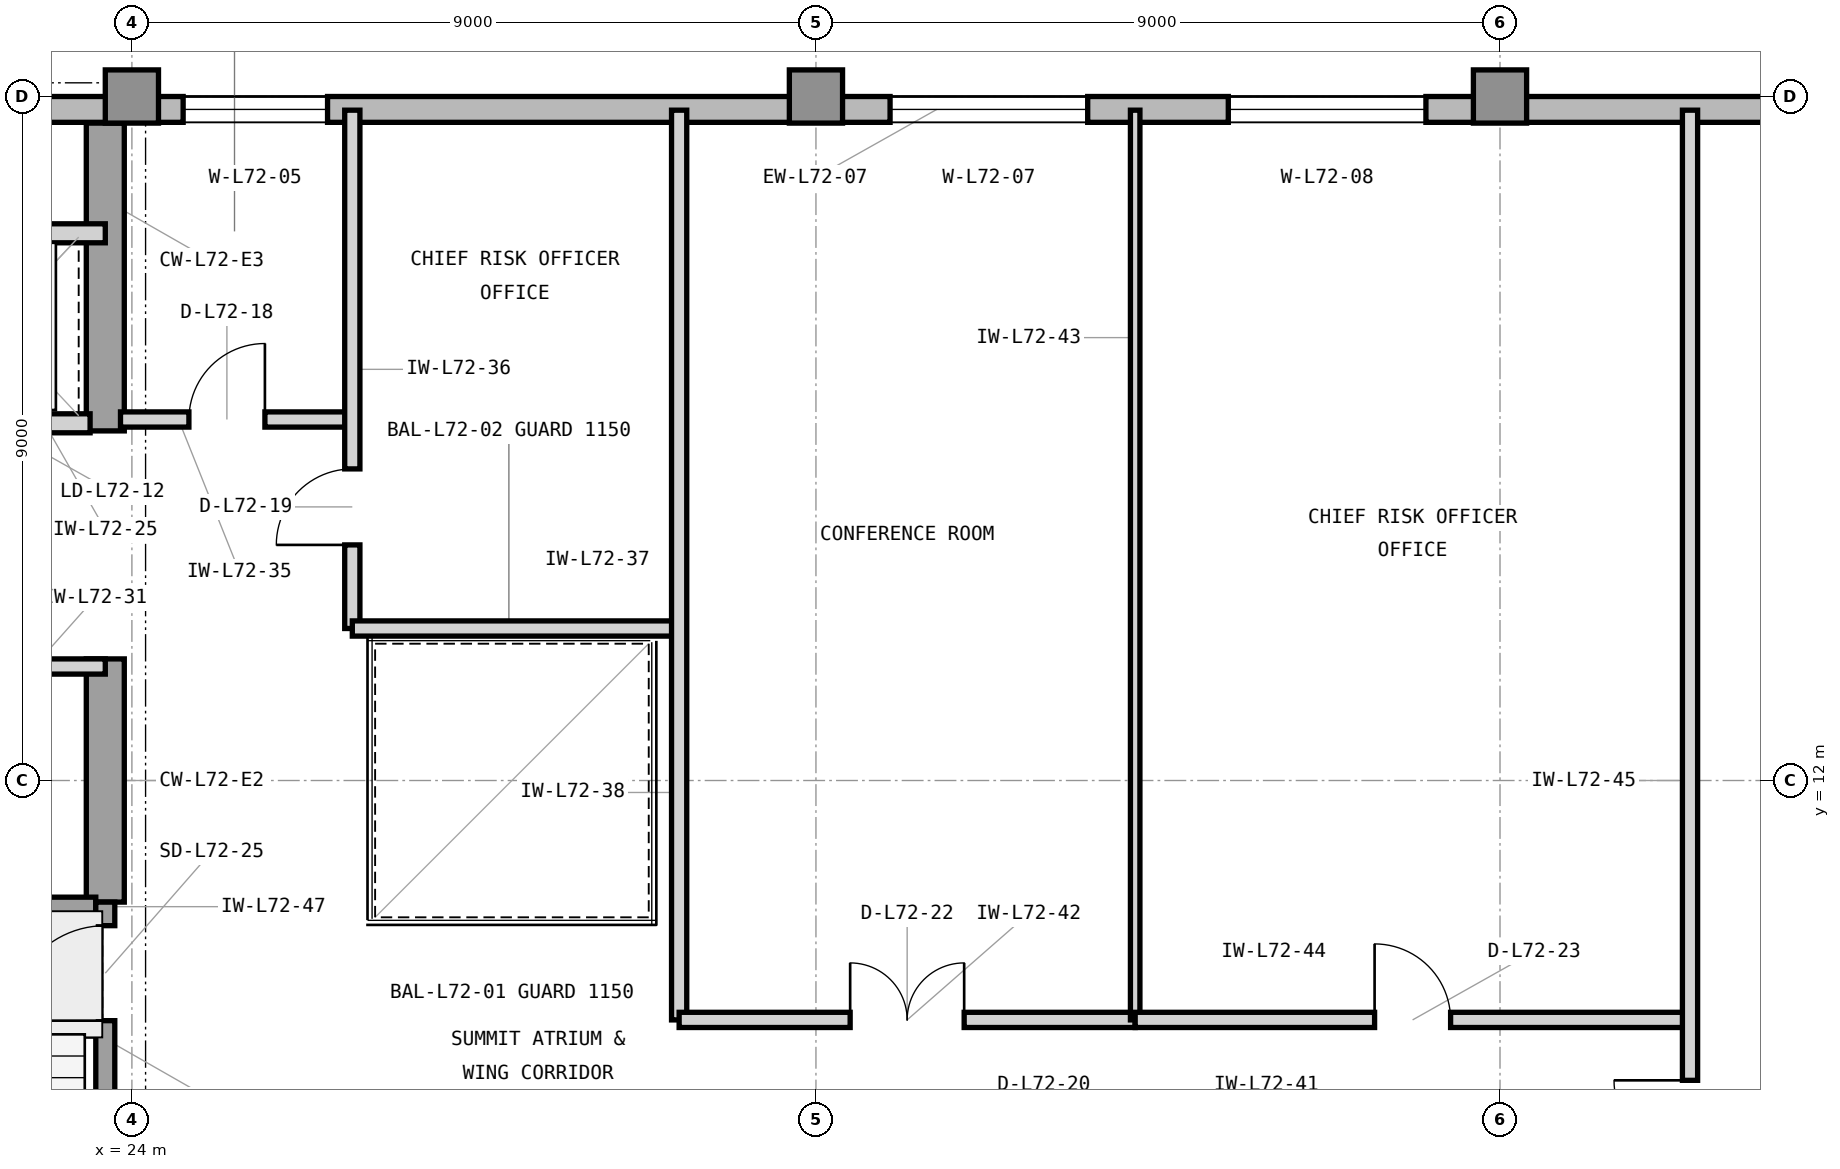
"""IFC4 building model, lengths in metres.
Left out: names, types, materials, properties, quantities, classifications, styles, units other than length and angle.
Written with IfcOpenShell. Run it as: python <this file> out.ifc"""

import sys

from ifc_helpers import new_model, si_unit, direction, frame, frame_2d, origin, origin_2d, place, context, subcontext, project, spatial, rectangle, extrude, element, fill, save


model = new_model("IFC4")
c1 = context("Model", 3, precision=1e-05, world=origin(), true_north=direction((0.0, 1.0)))
c2 = subcontext(c1, "Body", "Model", "MODEL_VIEW")
j1 = project(units=[si_unit("LENGTHUNIT", "METRE"), si_unit("PLANEANGLEUNIT", "RADIAN")], contexts=[c1])
p1 = place(None, origin())
s1 = spatial("IfcSite", under=j1, at=p1, CompositionType="ELEMENT")
p2 = place(p1, origin())
s2 = spatial("IfcBuilding", under=s1, at=p2, CompositionType="ELEMENT")
p3 = place(p2, frame((0.0, 0.0, 293.7)))
s3 = spatial("IfcBuildingStorey", under=s2, at=p3, CompositionType="ELEMENT", Elevation=293.7)
p4 = place(p3, frame((23.65, 10.4, 0.0), z_axis=(0.0, 0.0, 1.0), x_axis=(0.0, 1.0, 0.0)))
e1 = element("IfcWall", 1, at=p4, inside=s3, PredefinedType="SHEAR", context=c2, shape_type="SweptSolid", body=[
    extrude(rectangle(XDim=3.2, YDim=0.5, at=frame_2d((1.6, 0.0))), origin(), (0.0, 0.0, 1.0), 3.9),
])
p5 = place(p3, frame((23.65, 16.6, 0.0), z_axis=(0.0, 0.0, 1.0), x_axis=(0.0, 1.0, 0.0)))
e2 = element("IfcWall", 2, at=p5, inside=s3, PredefinedType="SHEAR", context=c2, shape_type="SweptSolid", body=[
    extrude(rectangle(XDim=4.05, YDim=0.5, at=frame_2d((2.025, 0.0))), origin(), (0.0, 0.0, 1.0), 3.9),
])
for number, where, z_axis, x_axis in (
    (3, (24.0, 21.0, 0.0), (0.0, 0.0, 1.0), (1.0, 0.0, 0.0)),
    (4, (33.0, 21.0, 0.0), (0.0, 0.0, 1.0), (1.0, 0.0, 0.0)),
    (5, (42.0, 21.0, 0.0), (0.0, 0.0, 1.0), (1.0, 0.0, 0.0)),
):
    element("IfcColumn", number, at=place(p3, frame(where, z_axis=z_axis, x_axis=x_axis)), inside=s3, PredefinedType="COLUMN", context=c2, shape_type="SweptSolid", body=[
        extrude(rectangle(XDim=0.7, YDim=0.7, at=origin_2d()), origin(), (0.0, 0.0, 1.0), 3.9),
    ])
p6 = place(p3, frame((49.4, 20.83, 0.0), z_axis=(0.0, 0.0, 1.0), x_axis=(-1.0, 0.0, 0.0)))
e6 = element("IfcWall", 6, at=p6, inside=s3, PredefinedType="STANDARD", context=c2, shape_type="SweptSolid", body=[
    extrude(rectangle(XDim=29.62, YDim=0.34, at=frame_2d((14.81, 0.0))), origin(), (0.0, 0.0, 1.0), 3.715),
])
p7 = place(p6, frame((22.826, 0.0, 0.8)))
e7 = element("IfcOpeningElement", 7, at=p7, cuts=e6, PredefinedType="OPENING", context=c2, shape_type="SweptSolid", body=[
    extrude(rectangle(XDim=1.9, YDim=2.35, at=frame_2d((0.95, 1.175))), frame((0.0, 0.18, 0.0), z_axis=(0.0, -1.0, 0.0), x_axis=(1.0, 0.0, 0.0)), (0.0, 0.0, 1.0), 0.36),
])
p8 = place(p6, frame((12.825, 0.0, 0.8)))
e8 = element("IfcOpeningElement", 8, at=p8, cuts=e6, PredefinedType="OPENING", context=c2, shape_type="SweptSolid", body=[
    extrude(rectangle(XDim=2.6, YDim=2.35, at=frame_2d((1.3, 1.175))), frame((0.0, 0.18, 0.0), z_axis=(0.0, -1.0, 0.0), x_axis=(1.0, 0.0, 0.0)), (0.0, 0.0, 1.0), 0.36),
])
p9 = place(p6, frame((8.375, 0.0, 0.8)))
e9 = element("IfcOpeningElement", 9, at=p9, cuts=e6, PredefinedType="OPENING", context=c2, shape_type="SweptSolid", body=[
    extrude(rectangle(XDim=2.6, YDim=2.35, at=frame_2d((1.3, 1.175))), frame((0.0, 0.18, 0.0), z_axis=(0.0, -1.0, 0.0), x_axis=(1.0, 0.0, 0.0)), (0.0, 0.0, 1.0), 0.36),
])
p10 = place(p3, frame((21.05, 16.7, 0.0), z_axis=(0.0, 0.0, 1.0), x_axis=(1.0, 0.0, 0.0)))
e10 = element("IfcWall", 10, at=p10, inside=s3, PredefinedType="PARTITIONING", context=c2, shape_type="SweptSolid", body=[
    extrude(rectangle(XDim=2.4, YDim=0.25, at=frame_2d((1.2, 0.0))), origin(), (0.0, 0.0, 1.0), 3.354),
])
p11 = place(p10, frame((0.52, 0.0, 0.0)))
e11 = element("IfcOpeningElement", 11, at=p11, cuts=e10, PredefinedType="OPENING", context=c2, shape_type="SweptSolid", body=[
    extrude(rectangle(XDim=1.15, YDim=2.25, at=frame_2d((0.575, 1.125))), frame((0.0, 0.135, 0.0), z_axis=(0.0, -1.0, 0.0), x_axis=(1.0, 0.0, 0.0)), (0.0, 0.0, 1.0), 0.27),
])
p12 = place(p3, frame((16.45, 19.2, 0.0), z_axis=(0.0, 0.0, 1.0), x_axis=(1.0, 0.0, 0.0)))
e12 = element("IfcWall", 12, at=p12, inside=s3, PredefinedType="PARTITIONING", context=c2, shape_type="SweptSolid", body=[
    extrude(rectangle(XDim=7.2, YDim=0.25, at=frame_2d((3.6, 0.0))), origin(), (0.0, 0.0, 1.0), 3.705),
])
p13 = place(p3, frame((19.9, 13.5, 0.0), z_axis=(0.0, 0.0, 1.0), x_axis=(1.0, 0.0, 0.0)))
e13 = element("IfcWall", 13, at=p13, inside=s3, PredefinedType="PARTITIONING", context=c2, shape_type="SweptSolid", body=[
    extrude(rectangle(XDim=3.75, YDim=0.2, at=frame_2d((1.875, 0.0))), origin(), (0.0, 0.0, 1.0), 3.354),
])
p14 = place(p13, frame((1.4, 0.0, 0.0)))
e14 = element("IfcOpeningElement", 14, at=p14, cuts=e13, PredefinedType="OPENING", context=c2, shape_type="SweptSolid", body=[
    extrude(rectangle(XDim=0.95, YDim=2.1, at=frame_2d((0.475, 1.05))), frame((0.0, 0.11, 0.0), z_axis=(0.0, -1.0, 0.0), x_axis=(1.0, 0.0, 0.0)), (0.0, 0.0, 1.0), 0.22),
])
p15 = place(p3, frame((23.85, 16.75, 0.0), z_axis=(0.0, 0.0, 1.0), x_axis=(1.0, 0.0, 0.0)))
e15 = element("IfcWall", 15, at=p15, inside=s3, PredefinedType="PARTITIONING", context=c2, shape_type="SweptSolid", body=[
    extrude(rectangle(XDim=3.05, YDim=0.2, at=frame_2d((1.525, 0.0))), origin(), (0.0, 0.0, 1.0), 3.705),
])
p16 = place(p15, frame((0.9, 0.0, 0.0)))
e16 = element("IfcOpeningElement", 16, at=p16, cuts=e15, PredefinedType="OPENING", context=c2, shape_type="SweptSolid", body=[
    extrude(rectangle(XDim=1.0, YDim=2.15, at=frame_2d((0.5, 1.075))), frame((0.0, 0.11, 0.0), z_axis=(0.0, -1.0, 0.0), x_axis=(1.0, 0.0, 0.0)), (0.0, 0.0, 1.0), 0.22),
])
p17 = place(p3, frame((26.9, 14.0, 0.0), z_axis=(0.0, 0.0, 1.0), x_axis=(0.0, 1.0, 0.0)))
e17 = element("IfcWall", 17, at=p17, inside=s3, PredefinedType="PARTITIONING", context=c2, shape_type="SweptSolid", body=[
    extrude(rectangle(XDim=6.82, YDim=0.2, at=frame_2d((3.41, 0.0))), origin(), (0.0, 0.0, 1.0), 3.705),
])
p18 = place(p17, frame((1.1, 0.0, 0.0)))
e18 = element("IfcOpeningElement", 18, at=p18, cuts=e17, PredefinedType="OPENING", context=c2, shape_type="SweptSolid", body=[
    extrude(rectangle(XDim=1.0, YDim=2.15, at=frame_2d((0.5, 1.075))), frame((0.0, 0.11, 0.0), z_axis=(0.0, -1.0, 0.0), x_axis=(1.0, 0.0, 0.0)), (0.0, 0.0, 1.0), 0.22),
])
p19 = place(p3, frame((26.9, 14.0, 0.0), z_axis=(0.0, 0.0, 1.0), x_axis=(1.0, 0.0, 0.0)))
e19 = element("IfcWall", 19, at=p19, inside=s3, PredefinedType="PARTITIONING", context=c2, shape_type="SweptSolid", body=[
    extrude(rectangle(XDim=4.3, YDim=0.2, at=frame_2d((2.15, 0.0))), origin(), (0.0, 0.0, 1.0), 3.705),
])
p20 = place(p3, frame((31.2, 8.85, 0.0), z_axis=(0.0, 0.0, 1.0), x_axis=(0.0, 1.0, 0.0)))
e20 = element("IfcWall", 20, at=p20, inside=s3, PredefinedType="PARTITIONING", context=c2, shape_type="SweptSolid", body=[
    extrude(rectangle(XDim=11.97, YDim=0.2, at=frame_2d((5.985, 0.0))), origin(), (0.0, 0.0, 1.0), 3.705),
])
p21 = place(p3, frame((31.2, 8.85, 0.0), z_axis=(0.0, 0.0, 1.0), x_axis=(1.0, 0.0, 0.0)))
e21 = element("IfcWall", 21, at=p21, inside=s3, PredefinedType="PARTITIONING", context=c2, shape_type="SweptSolid", body=[
    extrude(rectangle(XDim=6.0, YDim=0.2, at=frame_2d((3.0, 0.0))), origin(), (0.0, 0.0, 1.0), 3.705),
])
p22 = place(p21, frame((2.25, 0.0, 0.0)))
e22 = element("IfcOpeningElement", 22, at=p22, cuts=e21, PredefinedType="OPENING", context=c2, shape_type="SweptSolid", body=[
    extrude(rectangle(XDim=1.5, YDim=2.3, at=frame_2d((0.75, 1.15))), frame((0.0, 0.11, 0.0), z_axis=(0.0, -1.0, 0.0), x_axis=(1.0, 0.0, 0.0)), (0.0, 0.0, 1.0), 0.22),
])
p23 = place(p3, frame((37.2, 8.85, 0.0), z_axis=(0.0, 0.0, 1.0), x_axis=(0.0, 1.0, 0.0)))
e23 = element("IfcWall", 23, at=p23, inside=s3, PredefinedType="PARTITIONING", context=c2, shape_type="SweptSolid", body=[
    extrude(rectangle(XDim=11.97, YDim=0.125, at=frame_2d((5.985, 0.0))), origin(), (0.0, 0.0, 1.0), 3.705),
])
p24 = place(p3, frame((37.2, 8.85, 0.0), z_axis=(0.0, 0.0, 1.0), x_axis=(1.0, 0.0, 0.0)))
e24 = element("IfcWall", 24, at=p24, inside=s3, PredefinedType="PARTITIONING", context=c2, shape_type="SweptSolid", body=[
    extrude(rectangle(XDim=7.3, YDim=0.2, at=frame_2d((3.65, 0.0))), origin(), (0.0, 0.0, 1.0), 3.705),
])
p25 = place(p24, frame((3.15, 0.0, 0.0)))
e25 = element("IfcOpeningElement", 25, at=p25, cuts=e24, PredefinedType="OPENING", context=c2, shape_type="SweptSolid", body=[
    extrude(rectangle(XDim=1.0, YDim=2.15, at=frame_2d((0.5, 1.075))), frame((0.0, 0.11, 0.0), z_axis=(0.0, -1.0, 0.0), x_axis=(1.0, 0.0, 0.0)), (0.0, 0.0, 1.0), 0.22),
])
p26 = place(p3, frame((44.5, 3.18, 0.0), z_axis=(0.0, 0.0, 1.0), x_axis=(0.0, 1.0, 0.0)))
e26 = element("IfcWall", 26, at=p26, inside=s3, PredefinedType="PARTITIONING", context=c2, shape_type="SweptSolid", body=[
    extrude(rectangle(XDim=17.64, YDim=0.2, at=frame_2d((8.82, 0.0))), origin(), (0.0, 0.0, 1.0), 3.705),
])
p27 = place(p26, frame((3.875, 0.0, 0.0)))
e27 = element("IfcOpeningElement", 27, at=p27, cuts=e26, PredefinedType="OPENING", context=c2, shape_type="SweptSolid", body=[
    extrude(rectangle(XDim=1.0, YDim=2.15, at=frame_2d((0.5, 1.075))), frame((0.0, 0.11, 0.0), z_axis=(0.0, -1.0, 0.0), x_axis=(1.0, 0.0, 0.0)), (0.0, 0.0, 1.0), 0.22),
])
p28 = place(p3, frame((19.705, 10.34, 0.0), z_axis=(0.0, 0.0, 1.0), x_axis=(1.0, 0.0, 0.0)))
e28 = element("IfcWall", 28, at=p28, inside=s3, PredefinedType="SHEAR", context=c2, shape_type="SweptSolid", body=[
    extrude(rectangle(XDim=3.82, YDim=0.25, at=frame_2d((1.91, 0.0))), origin(), (0.0, 0.0, 1.0), 3.9),
])
p29 = place(p3, frame((23.65, 6.8, 0.0), z_axis=(0.0, 0.0, 1.0), x_axis=(0.0, 1.0, 0.0)))
e29 = element("IfcWall", 29, at=p29, inside=s3, PredefinedType="SHEAR", context=c2, shape_type="SweptSolid", body=[
    extrude(rectangle(XDim=3.6, YDim=0.25, at=frame_2d((1.8, 0.0))), origin(), (0.0, 0.0, 1.0), 3.9),
])
p30 = place(p29, frame((2.04, 0.0, 0.0)))
e30 = element("IfcOpeningElement", 30, at=p30, cuts=e29, PredefinedType="OPENING", context=c2, shape_type="SweptSolid", body=[
    extrude(rectangle(XDim=1.25, YDim=2.2, at=frame_2d((0.625, 1.1))), frame((0.0, 0.135, 0.0), z_axis=(0.0, -1.0, 0.0), x_axis=(1.0, 0.0, 0.0)), (0.0, 0.0, 1.0), 0.27),
])
p31 = place(p16, origin())
e31 = element("IfcDoor", 31, at=p31, inside=s3, OperationType="SINGLE_SWING_RIGHT", PredefinedType="DOOR", context=c2, shape_type="SweptSolid", body=[
    extrude(rectangle(XDim=1.0, YDim=2.15, at=frame_2d((0.5, 1.075))), frame((0.0, 0.025, 0.0), z_axis=(0.0, -1.0, 0.0), x_axis=(1.0, 0.0, 0.0)), (0.0, 0.0, 1.0), 0.05),
])
fill(e16, e31)
p32 = place(p18, origin())
e32 = element("IfcDoor", 32, at=p32, inside=s3, OperationType="SINGLE_SWING_LEFT", PredefinedType="DOOR", context=c2, shape_type="SweptSolid", body=[
    extrude(rectangle(XDim=1.0, YDim=2.15, at=frame_2d((0.5, 1.075))), frame((0.0, 0.025, 0.0), z_axis=(0.0, -1.0, 0.0), x_axis=(1.0, 0.0, 0.0)), (0.0, 0.0, 1.0), 0.05),
])
fill(e18, e32)
p33 = place(p22, origin())
e33 = element("IfcDoor", 33, at=p33, inside=s3, OperationType="DOUBLE_DOOR_SINGLE_SWING", PredefinedType="DOOR", context=c2, shape_type="SweptSolid", body=[
    extrude(rectangle(XDim=1.5, YDim=2.3, at=frame_2d((0.75, 1.15))), frame((0.0, 0.025, 0.0), z_axis=(0.0, -1.0, 0.0), x_axis=(1.0, 0.0, 0.0)), (0.0, 0.0, 1.0), 0.05),
])
fill(e22, e33)
p34 = place(p25, origin())
e34 = element("IfcDoor", 34, at=p34, inside=s3, OperationType="SINGLE_SWING_LEFT", PredefinedType="DOOR", context=c2, shape_type="SweptSolid", body=[
    extrude(rectangle(XDim=1.0, YDim=2.15, at=frame_2d((0.5, 1.075))), frame((0.0, 0.025, 0.0), z_axis=(0.0, -1.0, 0.0), x_axis=(1.0, 0.0, 0.0)), (0.0, 0.0, 1.0), 0.05),
])
fill(e25, e34)
p35 = place(p27, origin())
e35 = element("IfcDoor", 35, at=p35, inside=s3, OperationType="SINGLE_SWING_RIGHT", PredefinedType="DOOR", context=c2, shape_type="SweptSolid", body=[
    extrude(rectangle(XDim=1.0, YDim=2.15, at=frame_2d((0.5, 1.075))), frame((0.0, 0.025, 0.0), z_axis=(0.0, -1.0, 0.0), x_axis=(1.0, 0.0, 0.0)), (0.0, 0.0, 1.0), 0.05),
])
fill(e27, e35)
p36 = place(p30, origin())
e36 = element("IfcDoor", 36, at=p36, inside=s3, OperationType="SINGLE_SWING_LEFT", PredefinedType="DOOR", context=c2, shape_type="SweptSolid", body=[
    extrude(rectangle(XDim=1.25, YDim=2.2, at=frame_2d((0.625, 1.1))), frame((0.0, 0.025, 0.0), z_axis=(0.0, -1.0, 0.0), x_axis=(1.0, 0.0, 0.0)), (0.0, 0.0, 1.0), 0.05),
])
fill(e30, e36)
p37 = place(p7, origin())
e37 = element("IfcWindow", 37, at=p37, inside=s3, PartitioningType="SINGLE_PANEL", PredefinedType="WINDOW", context=c2, shape_type="SweptSolid", body=[
    extrude(rectangle(XDim=1.9, YDim=2.35, at=frame_2d((0.95, 1.175))), frame((0.0, 0.11, 0.0), z_axis=(0.0, -1.0, 0.0), x_axis=(1.0, 0.0, 0.0)), (0.0, 0.0, 1.0), 0.06),
])
fill(e7, e37)
p38 = place(p8, origin())
e38 = element("IfcWindow", 38, at=p38, inside=s3, PartitioningType="SINGLE_PANEL", PredefinedType="WINDOW", context=c2, shape_type="SweptSolid", body=[
    extrude(rectangle(XDim=2.6, YDim=2.35, at=frame_2d((1.3, 1.175))), frame((0.0, 0.11, 0.0), z_axis=(0.0, -1.0, 0.0), x_axis=(1.0, 0.0, 0.0)), (0.0, 0.0, 1.0), 0.06),
])
fill(e8, e38)
p39 = place(p9, origin())
e39 = element("IfcWindow", 39, at=p39, inside=s3, PartitioningType="SINGLE_PANEL", PredefinedType="WINDOW", context=c2, shape_type="SweptSolid", body=[
    extrude(rectangle(XDim=2.6, YDim=2.35, at=frame_2d((1.3, 1.175))), frame((0.0, 0.11, 0.0), z_axis=(0.0, -1.0, 0.0), x_axis=(1.0, 0.0, 0.0)), (0.0, 0.0, 1.0), 0.06),
])
fill(e9, e39)
save(model, sys.argv[1])
